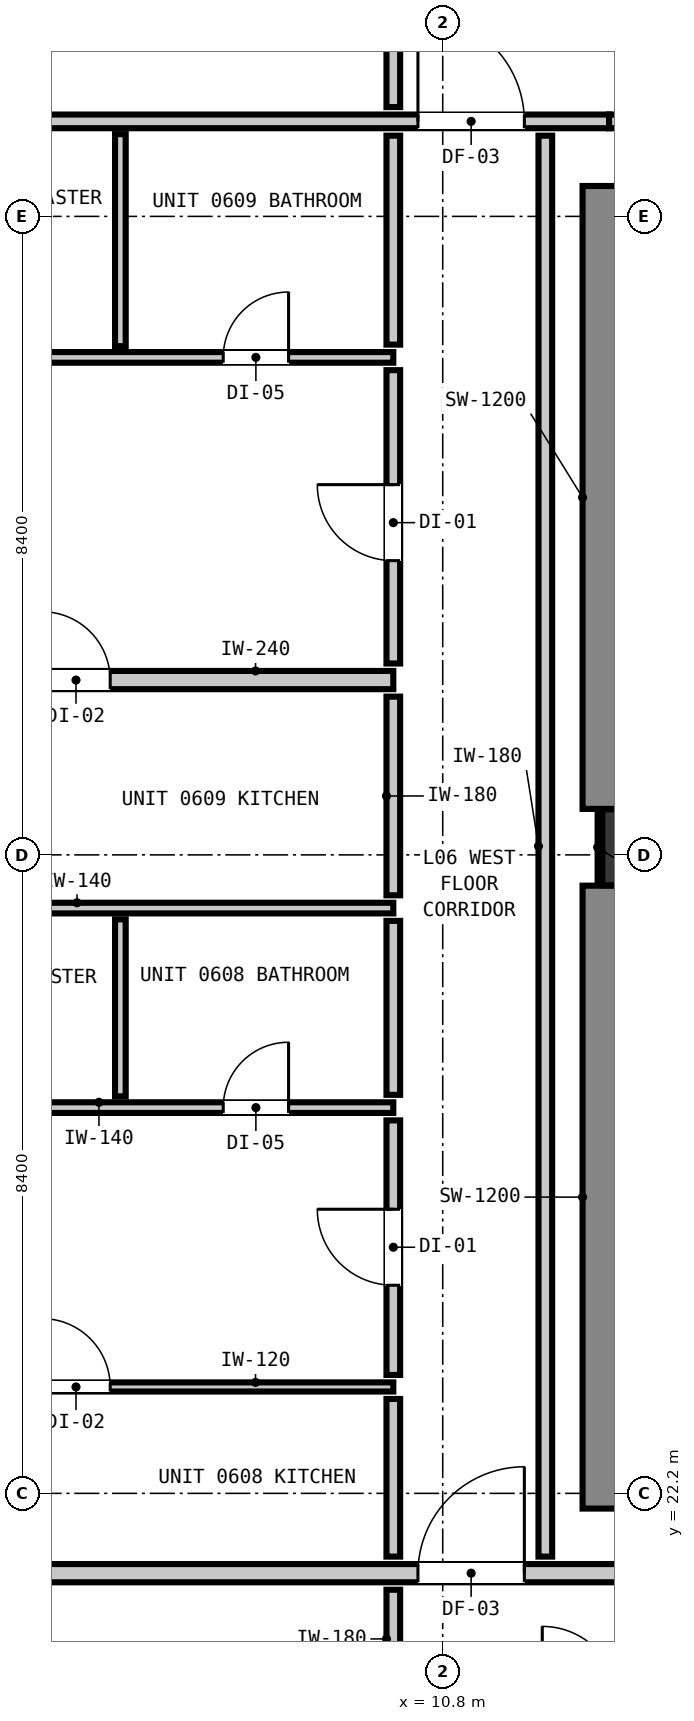
"""IFC4 building model, lengths in metres.
Left out: names, types, materials, properties, quantities, classifications, styles, units other than length and angle.
Written with IfcOpenShell. Run it as: python <this file> out.ifc"""

import sys

from ifc_helpers import new_model, si_unit, direction, frame, frame_2d, origin, origin_2d, place, context, subcontext, project, spatial, rectangle, extrude, element, fill, save


model = new_model("IFC4")
c1 = context("Model", 3, precision=1e-05, world=origin(), true_north=direction((0.0, 1.0)))
c2 = subcontext(c1, "Body", "Model", "MODEL_VIEW")
j1 = project(units=[si_unit("LENGTHUNIT", "METRE"), si_unit("PLANEANGLEUNIT", "RADIAN")], contexts=[c1])
p1 = place(None, origin())
s1 = spatial("IfcSite", under=j1, at=p1, CompositionType="ELEMENT")
p2 = place(p1, origin())
s2 = spatial("IfcBuilding", under=s1, at=p2, CompositionType="ELEMENT")
p3 = place(p2, frame((0.0, 0.0, 25.32)))
s3 = spatial("IfcBuildingStorey", under=s2, at=p3, CompositionType="ELEMENT", Elevation=25.32)
p4 = place(p3, frame((13.4, 30.7, 0.0), z_axis=(0.0, 0.0, 1.0), x_axis=(1.0, 0.0, 0.0)))
e1 = element("IfcColumn", 1, at=p4, inside=s3, PredefinedType="COLUMN", context=c2, shape_type="SweptSolid", body=[
    extrude(rectangle(XDim=1.0, YDim=1.0, at=origin_2d()), origin(), (0.0, 0.0, 1.0), 3.32),
])
p5 = place(p3, frame((13.24, 22.0, 0.0), z_axis=(0.0, 0.0, 1.0), x_axis=(0.0, 1.0, 0.0)))
e2 = element("IfcWall", 2, at=p5, inside=s3, PredefinedType="SHEAR", context=c2, shape_type="SweptSolid", body=[
    extrude(rectangle(XDim=8.195, YDim=1.2, at=frame_2d((4.098, 0.0))), origin(), (0.0, 0.0, 1.0), 3.32),
])
p6 = place(p3, frame((13.24, 31.205, 0.0), z_axis=(0.0, 0.0, 1.0), x_axis=(0.0, 1.0, 0.0)))
e3 = element("IfcWall", 3, at=p6, inside=s3, PredefinedType="SHEAR", context=c2, shape_type="SweptSolid", body=[
    extrude(rectangle(XDim=8.195, YDim=1.2, at=frame_2d((4.097, 0.0))), origin(), (0.0, 0.0, 1.0), 3.32),
])
p7 = place(p3, frame((1.827, 21.15, 0.0), z_axis=(0.0, 0.0, 1.0), x_axis=(1.0, 0.0, 0.0)))
e4 = element("IfcWall", 4, at=p7, inside=s3, PredefinedType="PARTITIONING", context=c2, shape_type="SweptSolid", body=[
    extrude(rectangle(XDim=42.146, YDim=0.24, at=frame_2d((21.073, 0.0))), origin(), (0.0, 0.0, 1.0), 3.06),
])
p8 = place(p7, frame((16.383, 0.0, 0.0)))
e5 = element("IfcOpeningElement", 5, at=p8, cuts=e4, PredefinedType="OPENING", context=c2, shape_type="SweptSolid", body=[
    extrude(rectangle(XDim=1.1, YDim=2.15, at=frame_2d((0.55, 1.075))), frame((0.0, 0.13, 0.0), z_axis=(0.0, -1.0, 0.0), x_axis=(1.0, 0.0, 0.0)), (0.0, 0.0, 1.0), 0.26),
])
p9 = place(p7, frame((8.647, 0.0, 0.0)))
e6 = element("IfcOpeningElement", 6, at=p9, cuts=e4, PredefinedType="OPENING", context=c2, shape_type="SweptSolid", body=[
    extrude(rectangle(XDim=1.4, YDim=2.15, at=frame_2d((0.7, 1.075))), frame((0.0, 0.13, 0.0), z_axis=(0.0, -1.0, 0.0), x_axis=(1.0, 0.0, 0.0)), (0.0, 0.0, 1.0), 0.26),
])
p10 = place(p7, frame((38.524, 0.0, 0.0)))
e7 = element("IfcOpeningElement", 7, at=p10, cuts=e4, PredefinedType="OPENING", context=c2, shape_type="SweptSolid", body=[
    extrude(rectangle(XDim=1.0, YDim=2.15, at=frame_2d((0.5, 1.075))), frame((0.0, 0.13, 0.0), z_axis=(0.0, -1.0, 0.0), x_axis=(1.0, 0.0, 0.0)), (0.0, 0.0, 1.0), 0.26),
])
p11 = place(p3, frame((1.827, 32.9, 0.0), z_axis=(0.0, 0.0, 1.0), x_axis=(1.0, 0.0, 0.0)))
e8 = element("IfcWall", 8, at=p11, inside=s3, PredefinedType="PARTITIONING", context=c2, shape_type="SweptSolid", body=[
    extrude(rectangle(XDim=8.323, YDim=0.24, at=frame_2d((4.162, 0.0))), origin(), (0.0, 0.0, 1.0), 3.06),
])
p12 = place(p11, frame((3.698, 0.0, 0.0)))
e9 = element("IfcOpeningElement", 9, at=p12, cuts=e8, PredefinedType="OPENING", context=c2, shape_type="SweptSolid", body=[
    extrude(rectangle(XDim=0.9, YDim=2.1, at=frame_2d((0.45, 1.05))), frame((0.0, 0.13, 0.0), z_axis=(0.0, -1.0, 0.0), x_axis=(1.0, 0.0, 0.0)), (0.0, 0.0, 1.0), 0.26),
])
p13 = place(p3, frame((2.661, 40.25, 0.0), z_axis=(0.0, 0.0, 1.0), x_axis=(1.0, 0.0, 0.0)))
e10 = element("IfcWall", 10, at=p13, inside=s3, PredefinedType="PARTITIONING", context=c2, shape_type="SweptSolid", body=[
    extrude(rectangle(XDim=10.328, YDim=0.18, at=frame_2d((5.164, 0.0))), origin(), (0.0, 0.0, 1.0), 2.445),
])
p14 = place(p13, frame((7.813, 0.0, 0.0)))
e11 = element("IfcOpeningElement", 11, at=p14, cuts=e10, PredefinedType="OPENING", context=c2, shape_type="SweptSolid", body=[
    extrude(rectangle(XDim=1.4, YDim=2.15, at=frame_2d((0.7, 1.075))), frame((0.0, 0.1, 0.0), z_axis=(0.0, -1.0, 0.0), x_axis=(1.0, 0.0, 0.0)), (0.0, 0.0, 1.0), 0.2),
])
p15 = place(p3, frame((12.989, 40.25, 0.0), z_axis=(0.0, 0.0, 1.0), x_axis=(1.0, 0.0, 0.0)))
e12 = element("IfcWall", 12, at=p15, inside=s3, PredefinedType="PARTITIONING", context=c2, shape_type="SweptSolid", body=[
    extrude(rectangle(XDim=30.984, YDim=0.18, at=frame_2d((15.492, 0.0))), origin(), (0.0, 0.0, 1.0), 3.06),
])
p16 = place(p15, frame((4.446, 0.0, 0.0)))
e13 = element("IfcOpeningElement", 13, at=p16, cuts=e12, PredefinedType="OPENING", context=c2, shape_type="SweptSolid", body=[
    extrude(rectangle(XDim=1.4, YDim=2.15, at=frame_2d((0.7, 1.075))), frame((0.0, 0.1, 0.0), z_axis=(0.0, -1.0, 0.0), x_axis=(1.0, 0.0, 0.0)), (0.0, 0.0, 1.0), 0.2),
])
p17 = place(p15, frame((27.362, 0.0, 0.0)))
e14 = element("IfcOpeningElement", 14, at=p17, cuts=e12, PredefinedType="OPENING", context=c2, shape_type="SweptSolid", body=[
    extrude(rectangle(XDim=1.0, YDim=2.15, at=frame_2d((0.5, 1.075))), frame((0.0, 0.1, 0.0), z_axis=(0.0, -1.0, 0.0), x_axis=(1.0, 0.0, 0.0)), (0.0, 0.0, 1.0), 0.2),
])
p18 = place(p3, frame((1.827, 27.275, 0.0), z_axis=(0.0, 0.0, 1.0), x_axis=(1.0, 0.0, 0.0)))
e15 = element("IfcWall", 15, at=p18, inside=s3, PredefinedType="PARTITIONING", context=c2, shape_type="SweptSolid", body=[
    extrude(rectangle(XDim=8.323, YDim=0.14, at=frame_2d((4.162, 0.0))), origin(), (0.0, 0.0, 1.0), 3.06),
])
p19 = place(p18, frame((6.085, 0.0, 0.0)))
e16 = element("IfcOpeningElement", 16, at=p19, cuts=e15, PredefinedType="OPENING", context=c2, shape_type="SweptSolid", body=[
    extrude(rectangle(XDim=0.86, YDim=2.02, at=frame_2d((0.43, 1.01))), frame((0.0, 0.08, 0.0), z_axis=(0.0, -1.0, 0.0), x_axis=(1.0, 0.0, 0.0)), (0.0, 0.0, 1.0), 0.16),
])
p20 = place(p18, frame((1.915, 0.0, 0.0)))
e17 = element("IfcOpeningElement", 17, at=p20, cuts=e15, PredefinedType="OPENING", context=c2, shape_type="SweptSolid", body=[
    extrude(rectangle(XDim=0.9, YDim=2.1, at=frame_2d((0.45, 1.05))), frame((0.0, 0.08, 0.0), z_axis=(0.0, -1.0, 0.0), x_axis=(1.0, 0.0, 0.0)), (0.0, 0.0, 1.0), 0.16),
])
p21 = place(p3, frame((1.827, 29.9, 0.0), z_axis=(0.0, 0.0, 1.0), x_axis=(1.0, 0.0, 0.0)))
e18 = element("IfcWall", 18, at=p21, inside=s3, PredefinedType="PARTITIONING", context=c2, shape_type="SweptSolid", body=[
    extrude(rectangle(XDim=8.323, YDim=0.14, at=frame_2d((4.162, 0.0))), origin(), (0.0, 0.0, 1.0), 3.06),
])
p22 = place(p3, frame((1.827, 37.145, 0.0), z_axis=(0.0, 0.0, 1.0), x_axis=(1.0, 0.0, 0.0)))
e19 = element("IfcWall", 19, at=p22, inside=s3, PredefinedType="PARTITIONING", context=c2, shape_type="SweptSolid", body=[
    extrude(rectangle(XDim=8.323, YDim=0.14, at=frame_2d((4.162, 0.0))), origin(), (0.0, 0.0, 1.0), 3.06),
])
p23 = place(p22, frame((6.085, 0.0, 0.0)))
e20 = element("IfcOpeningElement", 20, at=p23, cuts=e19, PredefinedType="OPENING", context=c2, shape_type="SweptSolid", body=[
    extrude(rectangle(XDim=0.86, YDim=2.02, at=frame_2d((0.43, 1.01))), frame((0.0, 0.08, 0.0), z_axis=(0.0, -1.0, 0.0), x_axis=(1.0, 0.0, 0.0)), (0.0, 0.0, 1.0), 0.16),
])
p24 = place(p22, frame((1.915, 0.0, 0.0)))
e21 = element("IfcOpeningElement", 21, at=p24, cuts=e19, PredefinedType="OPENING", context=c2, shape_type="SweptSolid", body=[
    extrude(rectangle(XDim=0.9, YDim=2.1, at=frame_2d((0.45, 1.05))), frame((0.0, 0.08, 0.0), z_axis=(0.0, -1.0, 0.0), x_axis=(1.0, 0.0, 0.0)), (0.0, 0.0, 1.0), 0.16),
])
p25 = place(p3, frame((1.827, 23.6, 0.0), z_axis=(0.0, 0.0, 1.0), x_axis=(1.0, 0.0, 0.0)))
e22 = element("IfcWall", 22, at=p25, inside=s3, PredefinedType="PARTITIONING", context=c2, shape_type="SweptSolid", body=[
    extrude(rectangle(XDim=8.323, YDim=0.12, at=frame_2d((4.162, 0.0))), origin(), (0.0, 0.0, 1.0), 3.06),
])
p26 = place(p25, frame((3.698, 0.0, 0.0)))
e23 = element("IfcOpeningElement", 23, at=p26, cuts=e22, PredefinedType="OPENING", context=c2, shape_type="SweptSolid", body=[
    extrude(rectangle(XDim=0.9, YDim=2.1, at=frame_2d((0.45, 1.05))), frame((0.0, 0.07, 0.0), z_axis=(0.0, -1.0, 0.0), x_axis=(1.0, 0.0, 0.0)), (0.0, 0.0, 1.0), 0.14),
])
p27 = place(p3, frame((10.15, 19.638, 0.0), z_axis=(0.0, 0.0, 1.0), x_axis=(0.0, 1.0, 0.0)))
e24 = element("IfcWall", 24, at=p27, inside=s3, PredefinedType="PARTITIONING", context=c2, shape_type="SweptSolid", body=[
    extrude(rectangle(XDim=1.294, YDim=0.18, at=frame_2d((0.647, 0.0))), origin(), (0.0, 0.0, 1.0), 3.06),
])
p28 = place(p3, frame((10.15, 21.368, 0.0), z_axis=(0.0, 0.0, 1.0), x_axis=(0.0, 1.0, 0.0)))
e25 = element("IfcWall", 25, at=p28, inside=s3, PredefinedType="PARTITIONING", context=c2, shape_type="SweptSolid", body=[
    extrude(rectangle(XDim=2.074, YDim=0.18, at=frame_2d((1.037, 0.0))), origin(), (0.0, 0.0, 1.0), 3.06),
])
p29 = place(p3, frame((10.15, 23.758, 0.0), z_axis=(0.0, 0.0, 1.0), x_axis=(0.0, 1.0, 0.0)))
e26 = element("IfcWall", 26, at=p29, inside=s3, PredefinedType="PARTITIONING", context=c2, shape_type="SweptSolid", body=[
    extrude(rectangle(XDim=3.349, YDim=0.18, at=frame_2d((1.674, 0.0))), origin(), (0.0, 0.0, 1.0), 3.06),
])
p30 = place(p29, frame((1.18, 0.0, 0.0)))
e27 = element("IfcOpeningElement", 27, at=p30, cuts=e26, PredefinedType="OPENING", context=c2, shape_type="SweptSolid", body=[
    extrude(rectangle(XDim=1.0, YDim=2.15, at=frame_2d((0.5, 1.075))), frame((0.0, 0.1, 0.0), z_axis=(0.0, -1.0, 0.0), x_axis=(1.0, 0.0, 0.0)), (0.0, 0.0, 1.0), 0.2),
])
p31 = place(p3, frame((10.15, 27.443, 0.0), z_axis=(0.0, 0.0, 1.0), x_axis=(0.0, 1.0, 0.0)))
e28 = element("IfcWall", 28, at=p31, inside=s3, PredefinedType="PARTITIONING", context=c2, shape_type="SweptSolid", body=[
    extrude(rectangle(XDim=2.289, YDim=0.18, at=frame_2d((1.145, 0.0))), origin(), (0.0, 0.0, 1.0), 3.06),
])
p32 = place(p3, frame((10.15, 30.068, 0.0), z_axis=(0.0, 0.0, 1.0), x_axis=(0.0, 1.0, 0.0)))
e29 = element("IfcWall", 29, at=p32, inside=s3, PredefinedType="PARTITIONING", context=c2, shape_type="SweptSolid", body=[
    extrude(rectangle(XDim=2.614, YDim=0.18, at=frame_2d((1.307, 0.0))), origin(), (0.0, 0.0, 1.0), 3.06),
])
p33 = place(p3, frame((10.15, 33.118, 0.0), z_axis=(0.0, 0.0, 1.0), x_axis=(0.0, 1.0, 0.0)))
e30 = element("IfcWall", 30, at=p33, inside=s3, PredefinedType="PARTITIONING", context=c2, shape_type="SweptSolid", body=[
    extrude(rectangle(XDim=3.859, YDim=0.18, at=frame_2d((1.93, 0.0))), origin(), (0.0, 0.0, 1.0), 3.06),
])
p34 = place(p33, frame((1.353, 0.0, 0.0)))
e31 = element("IfcOpeningElement", 31, at=p34, cuts=e30, PredefinedType="OPENING", context=c2, shape_type="SweptSolid", body=[
    extrude(rectangle(XDim=1.0, YDim=2.15, at=frame_2d((0.5, 1.075))), frame((0.0, 0.1, 0.0), z_axis=(0.0, -1.0, 0.0), x_axis=(1.0, 0.0, 0.0)), (0.0, 0.0, 1.0), 0.2),
])
p35 = place(p3, frame((10.15, 37.313, 0.0), z_axis=(0.0, 0.0, 1.0), x_axis=(0.0, 1.0, 0.0)))
e32 = element("IfcWall", 32, at=p35, inside=s3, PredefinedType="PARTITIONING", context=c2, shape_type="SweptSolid", body=[
    extrude(rectangle(XDim=2.749, YDim=0.18, at=frame_2d((1.375, 0.0))), origin(), (0.0, 0.0, 1.0), 3.06),
])
p36 = place(p3, frame((10.15, 40.438, 0.0), z_axis=(0.0, 0.0, 1.0), x_axis=(0.0, 1.0, 0.0)))
e33 = element("IfcWall", 33, at=p36, inside=s3, PredefinedType="PARTITIONING", context=c2, shape_type="SweptSolid", body=[
    extrude(rectangle(XDim=1.324, YDim=0.18, at=frame_2d((0.662, 0.0))), origin(), (0.0, 0.0, 1.0), 3.06),
])
p37 = place(p3, frame((12.15, 21.368, 0.0), z_axis=(0.0, 0.0, 1.0), x_axis=(0.0, 1.0, 0.0)))
e34 = element("IfcWall", 34, at=p37, inside=s3, PredefinedType="PARTITIONING", context=c2, shape_type="SweptSolid", body=[
    extrude(rectangle(XDim=18.694, YDim=0.18, at=frame_2d((9.347, 0.0))), origin(), (0.0, 0.0, 1.0), 3.06),
])
p38 = place(p3, frame((6.559, 27.423, 0.0), z_axis=(0.0, 0.0, 1.0), x_axis=(0.0, 1.0, 0.0)))
e35 = element("IfcWall", 35, at=p38, inside=s3, PredefinedType="PARTITIONING", context=c2, shape_type="SweptSolid", body=[
    extrude(rectangle(XDim=2.329, YDim=0.14, at=frame_2d((1.165, 0.0))), origin(), (0.0, 0.0, 1.0), 3.06),
])
p39 = place(p3, frame((6.559, 37.293, 0.0), z_axis=(0.0, 0.0, 1.0), x_axis=(0.0, 1.0, 0.0)))
e36 = element("IfcWall", 36, at=p39, inside=s3, PredefinedType="PARTITIONING", context=c2, shape_type="SweptSolid", body=[
    extrude(rectangle(XDim=2.789, YDim=0.14, at=frame_2d((1.395, 0.0))), origin(), (0.0, 0.0, 1.0), 3.06),
])
p40 = place(p3, frame((12.868, 30.21, 0.0), z_axis=(0.0, 0.0, 1.0), x_axis=(0.0, 1.0, 0.0)))
e37 = element("IfcWall", 37, at=p40, inside=s3, PredefinedType="PARTITIONING", context=c2, shape_type="SweptSolid", body=[
    extrude(rectangle(XDim=0.98, YDim=0.06, at=frame_2d((0.49, 0.0))), origin(), (0.0, 0.0, 1.0), 1.45),
])
p41 = place(p9, origin())
e38 = element("IfcDoor", 38, at=p41, inside=s3, OperationType="SINGLE_SWING_RIGHT", PredefinedType="DOOR", context=c2, shape_type="SweptSolid", body=[
    extrude(rectangle(XDim=1.4, YDim=2.15, at=frame_2d((0.7, 1.075))), frame((0.0, 0.025, 0.0), z_axis=(0.0, -1.0, 0.0), x_axis=(1.0, 0.0, 0.0)), (0.0, 0.0, 1.0), 0.05),
])
fill(e6, e38)
p42 = place(p14, origin())
e39 = element("IfcDoor", 39, at=p42, inside=s3, OperationType="SINGLE_SWING_LEFT", PredefinedType="DOOR", context=c2, shape_type="SweptSolid", body=[
    extrude(rectangle(XDim=1.4, YDim=2.15, at=frame_2d((0.7, 1.075))), frame((0.0, 0.025, 0.0), z_axis=(0.0, -1.0, 0.0), x_axis=(1.0, 0.0, 0.0)), (0.0, 0.0, 1.0), 0.05),
])
fill(e11, e39)
p43 = place(p30, origin())
e40 = element("IfcDoor", 40, at=p43, inside=s3, OperationType="SINGLE_SWING_RIGHT", PredefinedType="DOOR", context=c2, shape_type="SweptSolid", body=[
    extrude(rectangle(XDim=1.0, YDim=2.15, at=frame_2d((0.5, 1.075))), frame((0.0, 0.025, 0.0), z_axis=(0.0, -1.0, 0.0), x_axis=(1.0, 0.0, 0.0)), (0.0, 0.0, 1.0), 0.05),
])
fill(e27, e40)
p44 = place(p26, origin())
e41 = element("IfcDoor", 41, at=p44, inside=s3, OperationType="SINGLE_SWING_LEFT", PredefinedType="DOOR", context=c2, shape_type="SweptSolid", body=[
    extrude(rectangle(XDim=0.9, YDim=2.1, at=frame_2d((0.45, 1.05))), frame((0.0, 0.025, 0.0), z_axis=(0.0, -1.0, 0.0), x_axis=(1.0, 0.0, 0.0)), (0.0, 0.0, 1.0), 0.05),
])
fill(e23, e41)
p45 = place(p19, origin())
e42 = element("IfcDoor", 42, at=p45, inside=s3, OperationType="SINGLE_SWING_RIGHT", PredefinedType="DOOR", context=c2, shape_type="SweptSolid", body=[
    extrude(rectangle(XDim=0.86, YDim=2.02, at=frame_2d((0.43, 1.01))), frame((0.0, 0.025, 0.0), z_axis=(0.0, -1.0, 0.0), x_axis=(1.0, 0.0, 0.0)), (0.0, 0.0, 1.0), 0.05),
])
fill(e16, e42)
p46 = place(p34, origin())
e43 = element("IfcDoor", 43, at=p46, inside=s3, OperationType="SINGLE_SWING_RIGHT", PredefinedType="DOOR", context=c2, shape_type="SweptSolid", body=[
    extrude(rectangle(XDim=1.0, YDim=2.15, at=frame_2d((0.5, 1.075))), frame((0.0, 0.025, 0.0), z_axis=(0.0, -1.0, 0.0), x_axis=(1.0, 0.0, 0.0)), (0.0, 0.0, 1.0), 0.05),
])
fill(e31, e43)
p47 = place(p12, origin())
e44 = element("IfcDoor", 44, at=p47, inside=s3, OperationType="SINGLE_SWING_LEFT", PredefinedType="DOOR", context=c2, shape_type="SweptSolid", body=[
    extrude(rectangle(XDim=0.9, YDim=2.1, at=frame_2d((0.45, 1.05))), frame((0.0, 0.025, 0.0), z_axis=(0.0, -1.0, 0.0), x_axis=(1.0, 0.0, 0.0)), (0.0, 0.0, 1.0), 0.05),
])
fill(e9, e44)
p48 = place(p23, origin())
e45 = element("IfcDoor", 45, at=p48, inside=s3, OperationType="SINGLE_SWING_RIGHT", PredefinedType="DOOR", context=c2, shape_type="SweptSolid", body=[
    extrude(rectangle(XDim=0.86, YDim=2.02, at=frame_2d((0.43, 1.01))), frame((0.0, 0.025, 0.0), z_axis=(0.0, -1.0, 0.0), x_axis=(1.0, 0.0, 0.0)), (0.0, 0.0, 1.0), 0.05),
])
fill(e20, e45)
save(model, sys.argv[1])
